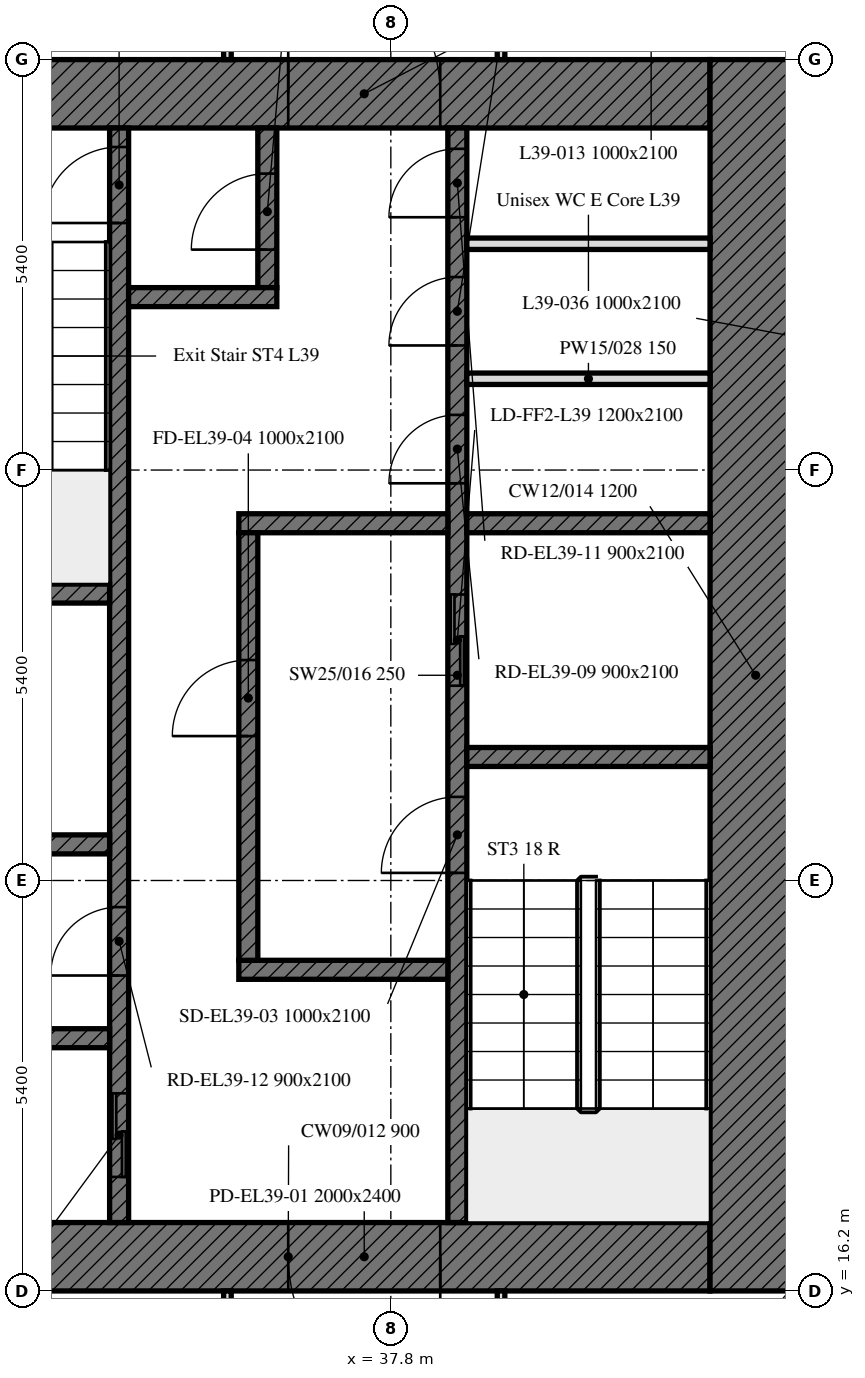
"""IFC4 building model, lengths in metres.
Left out: names, types, materials, properties, quantities, classifications, styles, units other than length and angle.
Written with IfcOpenShell. Run it as: python <this file> out.ifc"""

import sys

from ifc_helpers import new_model, si_unit, direction, frame, frame_2d, origin, place, context, subcontext, project, spatial, rectangle, extrude, element, fill, save


model = new_model("IFC4")
c1 = context("Model", 3, precision=1e-05, world=origin(), true_north=direction((0.0, 1.0)))
c2 = subcontext(c1, "Body", "Model", "MODEL_VIEW")
j1 = project(units=[si_unit("LENGTHUNIT", "METRE"), si_unit("PLANEANGLEUNIT", "RADIAN")], contexts=[c1])
p1 = place(None, origin())
s1 = spatial("IfcSite", under=j1, at=p1, CompositionType="ELEMENT")
p2 = place(p1, origin())
s2 = spatial("IfcBuilding", under=s1, at=p2, CompositionType="ELEMENT")
p3 = place(p2, frame((0.0, 0.0, 166.0)))
s3 = spatial("IfcBuildingStorey", under=s2, at=p3, CompositionType="ELEMENT", Elevation=166.0)
p4 = place(p3, frame((42.0, 16.65, 0.0), z_axis=(0.0, 0.0, 1.0), x_axis=(-1.0, 0.0, 0.0)))
e1 = element("IfcWall", 1, at=p4, inside=s3, PredefinedType="SOLIDWALL", context=c2, shape_type="SweptSolid", body=[
    extrude(rectangle(XDim=11.1, YDim=0.9, at=frame_2d((5.55, 0.0))), origin(), (0.0, 0.0, 1.0), 3.0),
])
p5 = place(p4, frame((3.55, 0.0, 0.0)))
e2 = element("IfcOpeningElement", 2, at=p5, cuts=e1, PredefinedType="OPENING", context=c2, shape_type="SweptSolid", body=[
    extrude(rectangle(XDim=2.0, YDim=2.4, at=frame_2d((1.0, 1.2))), frame((0.0, 0.45, 0.0), z_axis=(0.0, -1.0, 0.0), x_axis=(1.0, 0.0, 0.0)), (0.0, 0.0, 1.0), 0.9),
])
p6 = place(p3, frame((30.9, 31.95, 0.0), z_axis=(0.0, 0.0, 1.0), x_axis=(1.0, 0.0, 0.0)))
e3 = element("IfcWall", 3, at=p6, inside=s3, PredefinedType="SOLIDWALL", context=c2, shape_type="SweptSolid", body=[
    extrude(rectangle(XDim=11.1, YDim=0.9, at=frame_2d((5.55, 0.0))), origin(), (0.0, 0.0, 1.0), 3.0),
])
p7 = place(p6, frame((5.55, 0.0, 0.0)))
e4 = element("IfcOpeningElement", 4, at=p7, cuts=e3, PredefinedType="OPENING", context=c2, shape_type="SweptSolid", body=[
    extrude(rectangle(XDim=2.0, YDim=2.4, at=frame_2d((1.0, 1.2))), frame((0.0, 0.45, 0.0), z_axis=(0.0, -1.0, 0.0), x_axis=(1.0, 0.0, 0.0)), (0.0, 0.0, 1.0), 0.9),
])
p8 = place(p3, frame((42.6, 32.4, 0.0), z_axis=(0.0, 0.0, 1.0), x_axis=(0.0, -1.0, 0.0)))
e5 = element("IfcWall", 5, at=p8, inside=s3, PredefinedType="SOLIDWALL", context=c2, shape_type="SweptSolid", body=[
    extrude(rectangle(XDim=16.2, YDim=1.2, at=frame_2d((8.1, 0.0))), origin(), (0.0, 0.0, 1.0), 3.0),
])
p9 = place(p3, frame((38.675, 17.1, 0.0), z_axis=(0.0, 0.0, 1.0), x_axis=(0.0, 1.0, 0.0)))
e6 = element("IfcWall", 6, at=p9, inside=s3, PredefinedType="SOLIDWALL", context=c2, shape_type="SweptSolid", body=[
    extrude(rectangle(XDim=14.4, YDim=0.25, at=frame_2d((7.2, 0.0))), origin(), (0.0, 0.0, 1.0), 3.0),
])
p10 = place(p9, frame((4.6, 0.0, 0.0)))
e7 = element("IfcOpeningElement", 7, at=p10, cuts=e6, PredefinedType="OPENING", context=c2, shape_type="SweptSolid", body=[
    extrude(rectangle(XDim=1.0, YDim=2.1, at=frame_2d((0.5, 1.05))), frame((0.0, 0.125, 0.0), z_axis=(0.0, -1.0, 0.0), x_axis=(1.0, 0.0, 0.0)), (0.0, 0.0, 1.0), 0.25),
])
p11 = place(p9, frame((7.062, 0.0, 0.0)))
e8 = element("IfcOpeningElement", 8, at=p11, cuts=e6, PredefinedType="OPENING", context=c2, shape_type="SweptSolid", body=[
    extrude(rectangle(XDim=1.2, YDim=2.1, at=frame_2d((0.6, 1.05))), frame((0.0, 0.125, 0.0), z_axis=(0.0, -1.0, 0.0), x_axis=(1.0, 0.0, 0.0)), (0.0, 0.0, 1.0), 0.25),
])
p12 = place(p9, frame((9.726, 0.0, 0.0)))
e9 = element("IfcOpeningElement", 9, at=p12, cuts=e6, PredefinedType="OPENING", context=c2, shape_type="SweptSolid", body=[
    extrude(rectangle(XDim=0.9, YDim=2.1, at=frame_2d((0.45, 1.05))), frame((0.0, 0.125, 0.0), z_axis=(0.0, -1.0, 0.0), x_axis=(1.0, 0.0, 0.0)), (0.0, 0.0, 1.0), 0.25),
])
p13 = place(p9, frame((11.539, 0.0, 0.0)))
e10 = element("IfcOpeningElement", 10, at=p13, cuts=e6, PredefinedType="OPENING", context=c2, shape_type="SweptSolid", body=[
    extrude(rectangle(XDim=0.9, YDim=2.1, at=frame_2d((0.45, 1.05))), frame((0.0, 0.125, 0.0), z_axis=(0.0, -1.0, 0.0), x_axis=(1.0, 0.0, 0.0)), (0.0, 0.0, 1.0), 0.25),
])
p14 = place(p9, frame((13.226, 0.0, 0.0)))
e11 = element("IfcOpeningElement", 11, at=p14, cuts=e6, PredefinedType="OPENING", context=c2, shape_type="SweptSolid", body=[
    extrude(rectangle(XDim=0.9, YDim=2.1, at=frame_2d((0.45, 1.05))), frame((0.0, 0.125, 0.0), z_axis=(0.0, -1.0, 0.0), x_axis=(1.0, 0.0, 0.0)), (0.0, 0.0, 1.0), 0.25),
])
p15 = place(p3, frame((34.225, 17.1, 0.0), z_axis=(0.0, 0.0, 1.0), x_axis=(0.0, 1.0, 0.0)))
e12 = element("IfcWall", 12, at=p15, inside=s3, PredefinedType="SOLIDWALL", context=c2, shape_type="SweptSolid", body=[
    extrude(rectangle(XDim=14.4, YDim=0.25, at=frame_2d((7.2, 0.0))), origin(), (0.0, 0.0, 1.0), 3.0),
])
p16 = place(p15, frame((13.15, 0.0, 0.0)))
e13 = element("IfcOpeningElement", 13, at=p16, cuts=e12, PredefinedType="OPENING", context=c2, shape_type="SweptSolid", body=[
    extrude(rectangle(XDim=1.0, YDim=2.1, at=frame_2d((0.5, 1.05))), frame((0.0, 0.125, 0.0), z_axis=(0.0, -1.0, 0.0), x_axis=(1.0, 0.0, 0.0)), (0.0, 0.0, 1.0), 0.25),
])
p17 = place(p15, frame((0.6, 0.0, 0.0)))
e14 = element("IfcOpeningElement", 14, at=p17, cuts=e12, PredefinedType="OPENING", context=c2, shape_type="SweptSolid", body=[
    extrude(rectangle(XDim=1.1, YDim=2.1, at=frame_2d((0.55, 1.05))), frame((0.0, 0.125, 0.0), z_axis=(0.0, -1.0, 0.0), x_axis=(1.0, 0.0, 0.0)), (0.0, 0.0, 1.0), 0.25),
])
p18 = place(p15, frame((3.25, 0.0, 0.0)))
e15 = element("IfcOpeningElement", 15, at=p18, cuts=e12, PredefinedType="OPENING", context=c2, shape_type="SweptSolid", body=[
    extrude(rectangle(XDim=0.9, YDim=2.1, at=frame_2d((0.45, 1.05))), frame((0.0, 0.125, 0.0), z_axis=(0.0, -1.0, 0.0), x_axis=(1.0, 0.0, 0.0)), (0.0, 0.0, 1.0), 0.25),
])
p19 = place(p3, frame((38.8, 23.225, 0.0), z_axis=(0.0, 0.0, 1.0), x_axis=(1.0, 0.0, 0.0)))
e16 = element("IfcWall", 16, at=p19, inside=s3, PredefinedType="SOLIDWALL", context=c2, shape_type="SweptSolid", body=[
    extrude(rectangle(XDim=3.2, YDim=0.25, at=frame_2d((1.6, 0.0))), origin(), (0.0, 0.0, 1.0), 3.0),
])
for number, where, z_axis, x_axis in (
    (17, (30.9, 25.375, 0.0), (0.0, 0.0, 1.0), (1.0, 0.0, 0.0)),
    (18, (30.9, 22.075, 0.0), (0.0, 0.0, 1.0), (1.0, 0.0, 0.0)),
):
    element("IfcWall", number, at=place(p3, frame(where, z_axis=z_axis, x_axis=x_axis)), inside=s3, PredefinedType="SOLIDWALL", context=c2, shape_type="SweptSolid", body=[
        extrude(rectangle(XDim=3.2, YDim=0.25, at=frame_2d((1.6, 0.0))), origin(), (0.0, 0.0, 1.0), 3.0),
    ])
p20 = place(p3, frame((38.8, 26.3, 0.0), z_axis=(0.0, 0.0, 1.0), x_axis=(1.0, 0.0, 0.0)))
e19 = element("IfcWall", 19, at=p20, inside=s3, PredefinedType="SOLIDWALL", context=c2, shape_type="SweptSolid", body=[
    extrude(rectangle(XDim=3.2, YDim=0.25, at=frame_2d((1.6, 0.0))), origin(), (0.0, 0.0, 1.0), 3.0),
])
for number, where, z_axis, x_axis in (
    (20, (35.8, 26.3, 0.0), (0.0, 0.0, 1.0), (1.0, 0.0, 0.0)),
    (21, (35.8, 20.425, 0.0), (0.0, 0.0, 1.0), (1.0, 0.0, 0.0)),
):
    element("IfcWall", number, at=place(p3, frame(where, z_axis=z_axis, x_axis=x_axis)), inside=s3, PredefinedType="SOLIDWALL", context=c2, shape_type="SweptSolid", body=[
        extrude(rectangle(XDim=2.75, YDim=0.25, at=frame_2d((1.375, 0.0))), origin(), (0.0, 0.0, 1.0), 3.0),
    ])
p21 = place(p3, frame((36.175, 29.4, 0.0), z_axis=(0.0, 0.0, 1.0), x_axis=(0.0, 1.0, 0.0)))
e22 = element("IfcWall", 22, at=p21, inside=s3, PredefinedType="SOLIDWALL", context=c2, shape_type="SweptSolid", body=[
    extrude(rectangle(XDim=2.1, YDim=0.25, at=frame_2d((1.05, 0.0))), origin(), (0.0, 0.0, 1.0), 3.0),
])
p22 = place(p21, frame((0.5, 0.0, 0.0)))
e23 = element("IfcOpeningElement", 23, at=p22, cuts=e22, PredefinedType="OPENING", context=c2, shape_type="SweptSolid", body=[
    extrude(rectangle(XDim=1.0, YDim=2.1, at=frame_2d((0.5, 1.05))), frame((0.0, 0.125, 0.0), z_axis=(0.0, -1.0, 0.0), x_axis=(1.0, 0.0, 0.0)), (0.0, 0.0, 1.0), 0.25),
])
p23 = place(p3, frame((34.35, 29.275, 0.0), z_axis=(0.0, 0.0, 1.0), x_axis=(1.0, 0.0, 0.0)))
e24 = element("IfcWall", 24, at=p23, inside=s3, PredefinedType="SOLIDWALL", context=c2, shape_type="SweptSolid", body=[
    extrude(rectangle(XDim=1.95, YDim=0.25, at=frame_2d((0.975, 0.0))), origin(), (0.0, 0.0, 1.0), 3.0),
])
p24 = place(p3, frame((35.925, 20.55, 0.0), z_axis=(0.0, 0.0, 1.0), x_axis=(0.0, 1.0, 0.0)))
e25 = element("IfcWall", 25, at=p24, inside=s3, PredefinedType="SOLIDWALL", context=c2, shape_type="SweptSolid", body=[
    extrude(rectangle(XDim=5.625, YDim=0.25, at=frame_2d((2.812, 0.0))), origin(), (0.0, 0.0, 1.0), 3.0),
])
p25 = place(p24, frame((2.95, 0.0, 0.0)))
e26 = element("IfcOpeningElement", 26, at=p25, cuts=e25, PredefinedType="OPENING", context=c2, shape_type="SweptSolid", body=[
    extrude(rectangle(XDim=1.0, YDim=2.1, at=frame_2d((0.5, 1.05))), frame((0.0, 0.125, 0.0), z_axis=(0.0, -1.0, 0.0), x_axis=(1.0, 0.0, 0.0)), (0.0, 0.0, 1.0), 0.25),
])
p26 = place(p3, frame((30.9, 19.525, 0.0), z_axis=(0.0, 0.0, 1.0), x_axis=(1.0, 0.0, 0.0)))
e27 = element("IfcWall", 27, at=p26, inside=s3, PredefinedType="SOLIDWALL", context=c2, shape_type="SweptSolid", body=[
    extrude(rectangle(XDim=3.2, YDim=0.25, at=frame_2d((1.6, 0.0))), origin(), (0.0, 0.0, 1.0), 3.0),
])
for number, where, z_axis, x_axis in (
    (28, (38.8, 28.201, 0.0), (0.0, 0.0, 1.0), (1.0, 0.0, 0.0)),
    (29, (38.8, 29.977, 0.0), (0.0, 0.0, 1.0), (1.0, 0.0, 0.0)),
):
    element("IfcWall", number, at=place(p3, frame(where, z_axis=z_axis, x_axis=x_axis)), inside=s3, PredefinedType="PARTITIONING", context=c2, shape_type="SweptSolid", body=[
        extrude(rectangle(XDim=3.2, YDim=0.15, at=frame_2d((1.6, 0.0))), origin(), (0.0, 0.0, 1.0), 3.0),
    ])
for number, where, z_axis, x_axis in (
    (30, (35.65, 35.025, 0.0), (0.0, 0.0, 1.0), (0.0, -1.0, 0.0)),
    (31, (39.25, 32.4, 0.0), (0.0, 0.0, 1.0), (0.0, 1.0, 0.0)),
):
    element("IfcWall", number, at=place(p3, frame(where, z_axis=z_axis, x_axis=x_axis)), inside=s3, PredefinedType="PARTITIONING", context=c2, shape_type="SweptSolid", body=[
        extrude(rectangle(XDim=2.625, YDim=0.1, at=frame_2d((1.312, 0.0))), origin(), (0.0, 0.0, 1.0), 3.0),
    ])
for number, where, z_axis, x_axis in (
    (32, (35.65, 16.2, 0.0), (0.0, 0.0, 1.0), (0.0, -1.0, 0.0)),
    (33, (39.25, 8.175, 0.0), (0.0, 0.0, 1.0), (0.0, 1.0, 0.0)),
):
    element("IfcWall", number, at=place(p3, frame(where, z_axis=z_axis, x_axis=x_axis)), inside=s3, PredefinedType="PARTITIONING", context=c2, shape_type="SweptSolid", body=[
        extrude(rectangle(XDim=8.025, YDim=0.1, at=frame_2d((4.012, 0.0))), origin(), (0.0, 0.0, 1.0), 2.4),
    ])
p27 = place(p5, origin())
e34 = element("IfcDoor", 34, at=p27, inside=s3, OperationType="DOUBLE_DOOR_SINGLE_SWING", PredefinedType="DOOR", context=c2, shape_type="SweptSolid", body=[
    extrude(rectangle(XDim=2.0, YDim=2.4, at=frame_2d((1.0, 1.2))), frame((0.0, 0.025, 0.0), z_axis=(0.0, -1.0, 0.0), x_axis=(1.0, 0.0, 0.0)), (0.0, 0.0, 1.0), 0.05),
])
fill(e2, e34)
p28 = place(p7, origin())
e35 = element("IfcDoor", 35, at=p28, inside=s3, OperationType="DOUBLE_DOOR_SINGLE_SWING", PredefinedType="DOOR", context=c2, shape_type="SweptSolid", body=[
    extrude(rectangle(XDim=2.0, YDim=2.4, at=frame_2d((1.0, 1.2))), frame((0.0, 0.025, 0.0), z_axis=(0.0, -1.0, 0.0), x_axis=(1.0, 0.0, 0.0)), (0.0, 0.0, 1.0), 0.05),
])
fill(e4, e35)
p29 = place(p10, origin())
e36 = element("IfcDoor", 36, at=p29, inside=s3, OperationType="SINGLE_SWING_LEFT", PredefinedType="DOOR", context=c2, shape_type="SweptSolid", body=[
    extrude(rectangle(XDim=1.0, YDim=2.1, at=frame_2d((0.5, 1.05))), frame((0.0, 0.025, 0.0), z_axis=(0.0, -1.0, 0.0), x_axis=(1.0, 0.0, 0.0)), (0.0, 0.0, 1.0), 0.05),
])
fill(e7, e36)
p30 = place(p25, origin())
e37 = element("IfcDoor", 37, at=p30, inside=s3, OperationType="SINGLE_SWING_LEFT", PredefinedType="DOOR", context=c2, shape_type="SweptSolid", body=[
    extrude(rectangle(XDim=1.0, YDim=2.1, at=frame_2d((0.5, 1.05))), frame((0.0, 0.025, 0.0), z_axis=(0.0, -1.0, 0.0), x_axis=(1.0, 0.0, 0.0)), (0.0, 0.0, 1.0), 0.05),
])
fill(e26, e37)
p31 = place(p16, origin())
e38 = element("IfcDoor", 38, at=p31, inside=s3, OperationType="SINGLE_SWING_LEFT", PredefinedType="DOOR", context=c2, shape_type="SweptSolid", body=[
    extrude(rectangle(XDim=1.0, YDim=2.1, at=frame_2d((0.5, 1.05))), frame((0.0, 0.025, 0.0), z_axis=(0.0, -1.0, 0.0), x_axis=(1.0, 0.0, 0.0)), (0.0, 0.0, 1.0), 0.05),
])
fill(e13, e38)
p32 = place(p22, origin())
e39 = element("IfcDoor", 39, at=p32, inside=s3, OperationType="SINGLE_SWING_LEFT", PredefinedType="DOOR", context=c2, shape_type="SweptSolid", body=[
    extrude(rectangle(XDim=1.0, YDim=2.1, at=frame_2d((0.5, 1.05))), frame((0.0, 0.025, 0.0), z_axis=(0.0, -1.0, 0.0), x_axis=(1.0, 0.0, 0.0)), (0.0, 0.0, 1.0), 0.05),
])
fill(e23, e39)
p33 = place(p11, origin())
e40 = element("IfcDoor", 40, at=p33, inside=s3, OperationType="DOUBLE_DOOR_SLIDING", PredefinedType="DOOR", context=c2, shape_type="SweptSolid", body=[
    extrude(rectangle(XDim=1.2, YDim=2.1, at=frame_2d((0.6, 1.05))), frame((0.0, 0.025, 0.0), z_axis=(0.0, -1.0, 0.0), x_axis=(1.0, 0.0, 0.0)), (0.0, 0.0, 1.0), 0.05),
])
fill(e8, e40)
p34 = place(p17, origin())
e41 = element("IfcDoor", 41, at=p34, inside=s3, OperationType="DOUBLE_DOOR_SLIDING", PredefinedType="DOOR", context=c2, shape_type="SweptSolid", body=[
    extrude(rectangle(XDim=1.1, YDim=2.1, at=frame_2d((0.55, 1.05))), frame((0.0, 0.025, 0.0), z_axis=(0.0, -1.0, 0.0), x_axis=(1.0, 0.0, 0.0)), (0.0, 0.0, 1.0), 0.05),
])
fill(e14, e41)
p35 = place(p12, origin())
e42 = element("IfcDoor", 42, at=p35, inside=s3, OperationType="SINGLE_SWING_LEFT", PredefinedType="DOOR", context=c2, shape_type="SweptSolid", body=[
    extrude(rectangle(XDim=0.9, YDim=2.1, at=frame_2d((0.45, 1.05))), frame((0.0, 0.025, 0.0), z_axis=(0.0, -1.0, 0.0), x_axis=(1.0, 0.0, 0.0)), (0.0, 0.0, 1.0), 0.05),
])
fill(e9, e42)
p36 = place(p13, origin())
e43 = element("IfcDoor", 43, at=p36, inside=s3, OperationType="SINGLE_SWING_LEFT", PredefinedType="DOOR", context=c2, shape_type="SweptSolid", body=[
    extrude(rectangle(XDim=0.9, YDim=2.1, at=frame_2d((0.45, 1.05))), frame((0.0, 0.025, 0.0), z_axis=(0.0, -1.0, 0.0), x_axis=(1.0, 0.0, 0.0)), (0.0, 0.0, 1.0), 0.05),
])
fill(e10, e43)
p37 = place(p14, origin())
e44 = element("IfcDoor", 44, at=p37, inside=s3, OperationType="SINGLE_SWING_LEFT", PredefinedType="DOOR", context=c2, shape_type="SweptSolid", body=[
    extrude(rectangle(XDim=0.9, YDim=2.1, at=frame_2d((0.45, 1.05))), frame((0.0, 0.025, 0.0), z_axis=(0.0, -1.0, 0.0), x_axis=(1.0, 0.0, 0.0)), (0.0, 0.0, 1.0), 0.05),
])
fill(e11, e44)
p38 = place(p18, origin())
e45 = element("IfcDoor", 45, at=p38, inside=s3, OperationType="SINGLE_SWING_LEFT", PredefinedType="DOOR", context=c2, shape_type="SweptSolid", body=[
    extrude(rectangle(XDim=0.9, YDim=2.1, at=frame_2d((0.45, 1.05))), frame((0.0, 0.025, 0.0), z_axis=(0.0, -1.0, 0.0), x_axis=(1.0, 0.0, 0.0)), (0.0, 0.0, 1.0), 0.05),
])
fill(e15, e45)
save(model, sys.argv[1])
